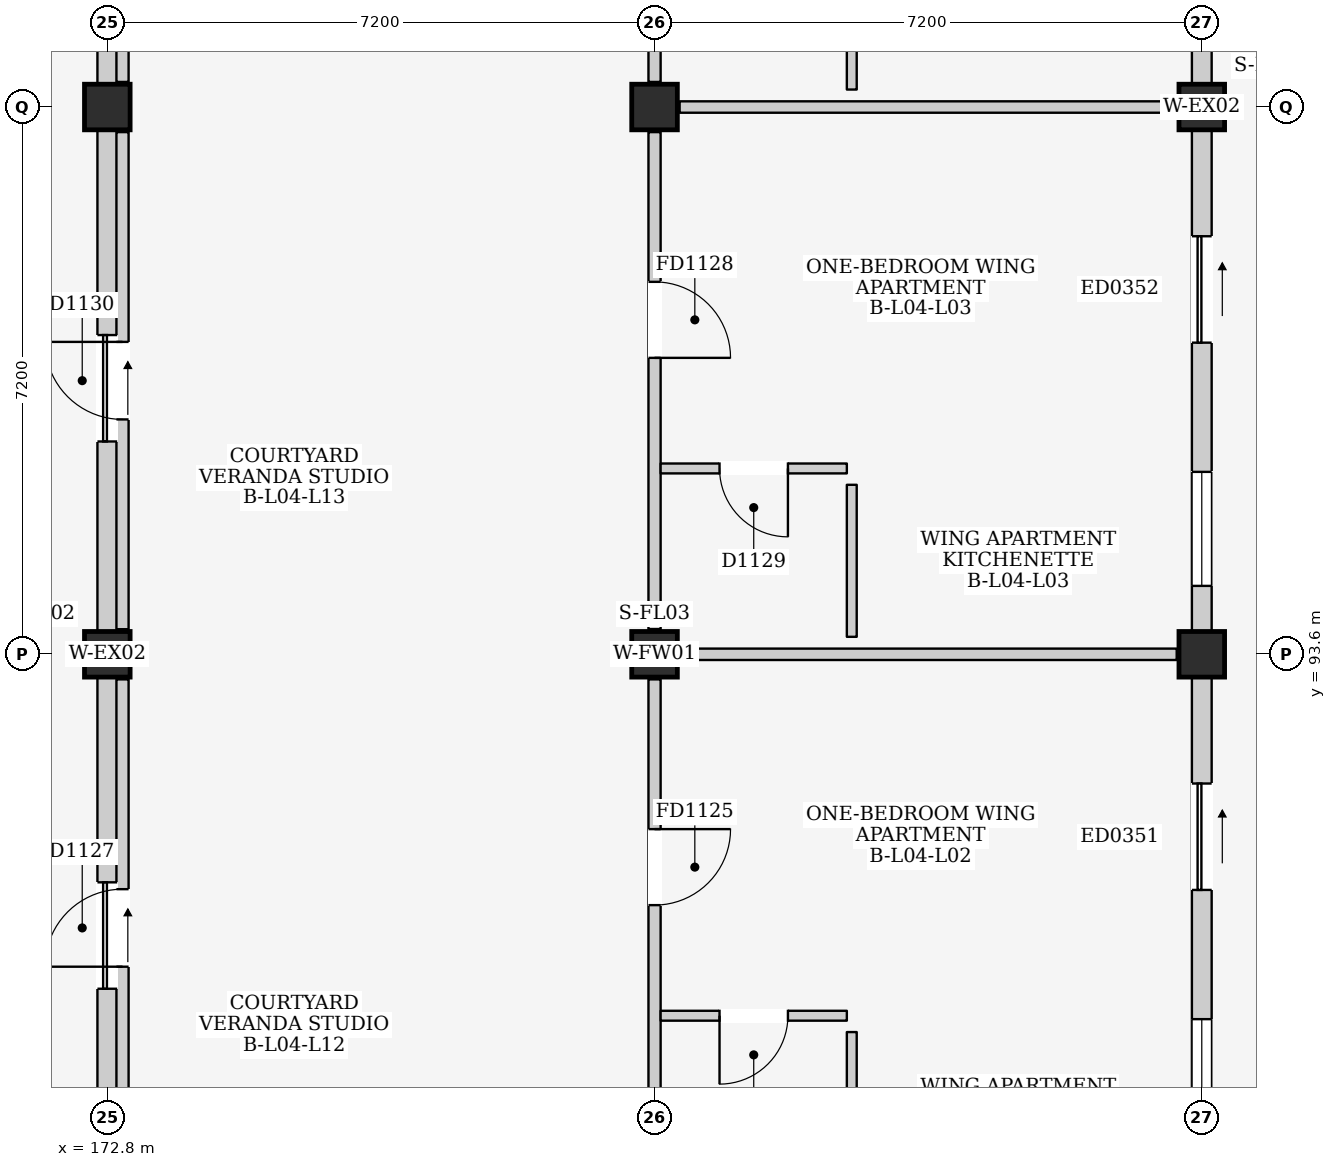
"""IFC4 building model, lengths in metres.
Left out: names, types, materials, properties, quantities, classifications, styles, units other than length and angle.
Written with IfcOpenShell. Run it as: python <this file> out.ifc"""

import sys

from ifc_helpers import new_model, si_unit, direction, frame, frame_2d, origin, origin_2d, place, context, subcontext, project, spatial, rectangle, extrude, element, fill, save


model = new_model("IFC4")
c1 = context("Model", 3, precision=1e-05, world=origin(), true_north=direction((0.0, 1.0)))
c2 = subcontext(c1, "Body", "Model", "MODEL_VIEW")
j1 = project(units=[si_unit("LENGTHUNIT", "METRE"), si_unit("PLANEANGLEUNIT", "RADIAN")], contexts=[c1])
p1 = place(None, origin())
s1 = spatial("IfcSite", under=j1, at=p1, CompositionType="ELEMENT")
p2 = place(p1, origin())
s2 = spatial("IfcBuilding", under=s1, at=p2, CompositionType="ELEMENT")
p3 = place(p2, frame((0.0, 0.0, 15.4)))
s3 = spatial("IfcBuildingStorey", under=s2, at=p3, CompositionType="ELEMENT", Elevation=15.4)
for number, where, z_axis, x_axis in (
    (1, (172.8, 93.6, 0.0), (0.0, 0.0, 1.0), (1.0, 0.0, 0.0)),
    (2, (172.8, 100.8, 0.0), (0.0, 0.0, 1.0), (1.0, 0.0, 0.0)),
    (3, (180.0, 93.6, 0.0), (0.0, 0.0, 1.0), (1.0, 0.0, 0.0)),
    (4, (180.0, 100.8, 0.0), (0.0, 0.0, 1.0), (1.0, 0.0, 0.0)),
    (5, (187.2, 93.6, 0.0), (0.0, 0.0, 1.0), (1.0, 0.0, 0.0)),
    (6, (187.2, 100.8, 0.0), (0.0, 0.0, 1.0), (1.0, 0.0, 0.0)),
):
    element("IfcColumn", number, at=place(p3, frame(where, z_axis=z_axis, x_axis=x_axis)), inside=s3, PredefinedType="COLUMN", context=c2, shape_type="SweptSolid", body=[
        extrude(rectangle(XDim=0.6, YDim=0.6, at=origin_2d()), origin(), (0.0, 0.0, 1.0), 3.2),
    ])
p4 = place(p3, frame((172.8, 86.7, 0.0), z_axis=(0.0, 0.0, 1.0), x_axis=(0.0, 1.0, 0.0)))
e7 = element("IfcWall", 7, at=p4, inside=s3, PredefinedType="ELEMENTEDWALL", context=c2, shape_type="SweptSolid", body=[
    extrude(rectangle(XDim=6.6, YDim=0.26, at=frame_2d((3.3, 0.0))), origin(), (0.0, 0.0, 1.0), 2.385),
])
p5 = place(p4, frame((2.5, 0.0, 0.0)))
e8 = element("IfcOpeningElement", 8, at=p5, cuts=e7, PredefinedType="OPENING", context=c2, shape_type="SweptSolid", body=[
    extrude(rectangle(XDim=1.4, YDim=2.1, at=frame_2d((0.7, 1.05))), frame((0.0, 0.145, 0.0), z_axis=(0.0, -1.0, 0.0), x_axis=(1.0, 0.0, 0.0)), (0.0, 0.0, 1.0), 0.29),
])
p6 = place(p3, frame((172.8, 93.9, 0.0), z_axis=(0.0, 0.0, 1.0), x_axis=(0.0, 1.0, 0.0)))
e9 = element("IfcWall", 9, at=p6, inside=s3, PredefinedType="ELEMENTEDWALL", context=c2, shape_type="SweptSolid", body=[
    extrude(rectangle(XDim=6.6, YDim=0.26, at=frame_2d((3.3, 0.0))), origin(), (0.0, 0.0, 1.0), 2.385),
])
p7 = place(p6, frame((2.5, 0.0, 0.0)))
e10 = element("IfcOpeningElement", 10, at=p7, cuts=e9, PredefinedType="OPENING", context=c2, shape_type="SweptSolid", body=[
    extrude(rectangle(XDim=1.4, YDim=2.1, at=frame_2d((0.7, 1.05))), frame((0.0, 0.145, 0.0), z_axis=(0.0, -1.0, 0.0), x_axis=(1.0, 0.0, 0.0)), (0.0, 0.0, 1.0), 0.29),
])
p8 = place(p3, frame((172.8, 101.1, 0.0), z_axis=(0.0, 0.0, 1.0), x_axis=(0.0, 1.0, 0.0)))
e11 = element("IfcWall", 11, at=p8, inside=s3, PredefinedType="ELEMENTEDWALL", context=c2, shape_type="SweptSolid", body=[
    extrude(rectangle(XDim=6.6, YDim=0.26, at=frame_2d((3.3, 0.0))), origin(), (0.0, 0.0, 1.0), 2.385),
])
p9 = place(p8, frame((2.5, 0.0, 0.0)))
e12 = element("IfcOpeningElement", 12, at=p9, cuts=e11, PredefinedType="OPENING", context=c2, shape_type="SweptSolid", body=[
    extrude(rectangle(XDim=1.4, YDim=2.1, at=frame_2d((0.7, 1.05))), frame((0.0, 0.145, 0.0), z_axis=(0.0, -1.0, 0.0), x_axis=(1.0, 0.0, 0.0)), (0.0, 0.0, 1.0), 0.29),
])
p10 = place(p3, frame((187.2, 86.7, 0.0), z_axis=(0.0, 0.0, 1.0), x_axis=(0.0, 1.0, 0.0)))
e13 = element("IfcWall", 13, at=p10, inside=s3, PredefinedType="ELEMENTEDWALL", context=c2, shape_type="SweptSolid", body=[
    extrude(rectangle(XDim=6.6, YDim=0.26, at=frame_2d((3.3, 0.0))), origin(), (0.0, 0.0, 1.0), 2.43),
])
p11 = place(p10, frame((3.8, 0.0, 0.0)))
e14 = element("IfcOpeningElement", 14, at=p11, cuts=e13, PredefinedType="OPENING", context=c2, shape_type="SweptSolid", body=[
    extrude(rectangle(XDim=1.4, YDim=2.1, at=frame_2d((0.7, 1.05))), frame((0.0, 0.145, 0.0), z_axis=(0.0, -1.0, 0.0), x_axis=(1.0, 0.0, 0.0)), (0.0, 0.0, 1.0), 0.29),
])
p12 = place(p10, frame((0.6, 0.0, 0.81)))
e15 = element("IfcOpeningElement", 15, at=p12, cuts=e13, PredefinedType="OPENING", context=c2, shape_type="SweptSolid", body=[
    extrude(rectangle(XDim=1.5, YDim=1.5, at=frame_2d((0.75, 0.75))), frame((0.0, 0.145, 0.0), z_axis=(0.0, -1.0, 0.0), x_axis=(1.0, 0.0, 0.0)), (0.0, 0.0, 1.0), 0.29),
])
p13 = place(p3, frame((187.2, 93.9, 0.0), z_axis=(0.0, 0.0, 1.0), x_axis=(0.0, 1.0, 0.0)))
e16 = element("IfcWall", 16, at=p13, inside=s3, PredefinedType="ELEMENTEDWALL", context=c2, shape_type="SweptSolid", body=[
    extrude(rectangle(XDim=6.6, YDim=0.26, at=frame_2d((3.3, 0.0))), origin(), (0.0, 0.0, 1.0), 2.43),
])
p14 = place(p13, frame((3.8, 0.0, 0.0)))
e17 = element("IfcOpeningElement", 17, at=p14, cuts=e16, PredefinedType="OPENING", context=c2, shape_type="SweptSolid", body=[
    extrude(rectangle(XDim=1.4, YDim=2.1, at=frame_2d((0.7, 1.05))), frame((0.0, 0.145, 0.0), z_axis=(0.0, -1.0, 0.0), x_axis=(1.0, 0.0, 0.0)), (0.0, 0.0, 1.0), 0.29),
])
p15 = place(p13, frame((0.6, 0.0, 0.81)))
e18 = element("IfcOpeningElement", 18, at=p15, cuts=e16, PredefinedType="OPENING", context=c2, shape_type="SweptSolid", body=[
    extrude(rectangle(XDim=1.5, YDim=1.5, at=frame_2d((0.75, 0.75))), frame((0.0, 0.145, 0.0), z_axis=(0.0, -1.0, 0.0), x_axis=(1.0, 0.0, 0.0)), (0.0, 0.0, 1.0), 0.29),
])
p16 = place(p3, frame((187.2, 101.1, 0.0), z_axis=(0.0, 0.0, 1.0), x_axis=(0.0, 1.0, 0.0)))
e19 = element("IfcWall", 19, at=p16, inside=s3, PredefinedType="ELEMENTEDWALL", context=c2, shape_type="SweptSolid", body=[
    extrude(rectangle(XDim=6.6, YDim=0.26, at=frame_2d((3.3, 0.0))), origin(), (0.0, 0.0, 1.0), 2.43),
])
p17 = place(p16, frame((3.8, 0.0, 0.0)))
e20 = element("IfcOpeningElement", 20, at=p17, cuts=e19, PredefinedType="OPENING", context=c2, shape_type="SweptSolid", body=[
    extrude(rectangle(XDim=1.4, YDim=2.1, at=frame_2d((0.7, 1.05))), frame((0.0, 0.145, 0.0), z_axis=(0.0, -1.0, 0.0), x_axis=(1.0, 0.0, 0.0)), (0.0, 0.0, 1.0), 0.29),
])
p18 = place(p16, frame((0.6, 0.0, 0.81)))
e21 = element("IfcOpeningElement", 21, at=p18, cuts=e19, PredefinedType="OPENING", context=c2, shape_type="SweptSolid", body=[
    extrude(rectangle(XDim=1.5, YDim=1.5, at=frame_2d((0.75, 0.75))), frame((0.0, 0.145, 0.0), z_axis=(0.0, -1.0, 0.0), x_axis=(1.0, 0.0, 0.0)), (0.0, 0.0, 1.0), 0.29),
])
p19 = place(p3, frame((180.0, 86.73, 0.0), z_axis=(0.0, 0.0, 1.0), x_axis=(0.0, 1.0, 0.0)))
e22 = element("IfcWall", 22, at=p19, inside=s3, PredefinedType="PARTITIONING", context=c2, shape_type="SweptSolid", body=[
    extrude(rectangle(XDim=6.54, YDim=0.16, at=frame_2d((3.27, 0.0))), origin(), (0.0, 0.0, 1.0), 2.385),
])
p20 = place(p19, frame((3.57, 0.0, 0.0)))
e23 = element("IfcOpeningElement", 23, at=p20, cuts=e22, PredefinedType="OPENING", context=c2, shape_type="SweptSolid", body=[
    extrude(rectangle(XDim=1.0, YDim=2.15, at=frame_2d((0.5, 1.075))), frame((0.0, 0.095, 0.0), z_axis=(0.0, -1.0, 0.0), x_axis=(1.0, 0.0, 0.0)), (0.0, 0.0, 1.0), 0.19),
])
p21 = place(p3, frame((180.33, 93.6, 0.0), z_axis=(0.0, 0.0, 1.0), x_axis=(1.0, 0.0, 0.0)))
e24 = element("IfcWall", 24, at=p21, inside=s3, PredefinedType="PARTITIONING", context=c2, shape_type="SweptSolid", body=[
    extrude(rectangle(XDim=6.54, YDim=0.15, at=frame_2d((3.27, 0.0))), origin(), (0.0, 0.0, 1.0), 2.335),
])
p22 = place(p3, frame((180.08, 88.845, 0.0), z_axis=(0.0, 0.0, 1.0), x_axis=(1.0, 0.0, 0.0)))
e25 = element("IfcWall", 25, at=p22, inside=s3, PredefinedType="PARTITIONING", context=c2, shape_type="SweptSolid", body=[
    extrude(rectangle(XDim=2.45, YDim=0.13, at=frame_2d((1.225, 0.0))), origin(), (0.0, 0.0, 1.0), 2.95),
])
p23 = place(p22, frame((0.775, 0.0, 0.0)))
e26 = element("IfcOpeningElement", 26, at=p23, cuts=e25, PredefinedType="OPENING", context=c2, shape_type="SweptSolid", body=[
    extrude(rectangle(XDim=0.9, YDim=2.1, at=frame_2d((0.45, 1.05))), frame((0.0, 0.08, 0.0), z_axis=(0.0, -1.0, 0.0), x_axis=(1.0, 0.0, 0.0)), (0.0, 0.0, 1.0), 0.16),
])
p24 = place(p3, frame((182.595, 86.63, 0.0), z_axis=(0.0, 0.0, 1.0), x_axis=(0.0, 1.0, 0.0)))
e27 = element("IfcWall", 27, at=p24, inside=s3, PredefinedType="PARTITIONING", context=c2, shape_type="SweptSolid", body=[
    extrude(rectangle(XDim=2.0, YDim=0.13, at=frame_2d((1.0, 0.0))), origin(), (0.0, 0.0, 1.0), 2.95),
])
p25 = place(p3, frame((173.0, 86.73, 0.0), z_axis=(0.0, 0.0, 1.0), x_axis=(0.0, 1.0, 0.0)))
e28 = element("IfcWall", 28, at=p25, inside=s3, PredefinedType="PARTITIONING", context=c2, shape_type="SweptSolid", body=[
    extrude(rectangle(XDim=6.54, YDim=0.16, at=frame_2d((3.27, 0.0))), origin(), (0.0, 0.0, 1.0), 2.385),
])
p26 = place(p25, frame((2.76, 0.0, 0.0)))
e29 = element("IfcOpeningElement", 29, at=p26, cuts=e28, PredefinedType="OPENING", context=c2, shape_type="SweptSolid", body=[
    extrude(rectangle(XDim=1.02, YDim=2.18, at=frame_2d((0.51, 1.09))), frame((0.0, 0.095, 0.0), z_axis=(0.0, -1.0, 0.0), x_axis=(1.0, 0.0, 0.0)), (0.0, 0.0, 1.0), 0.19),
])
p27 = place(p3, frame((180.0, 93.93, 0.0), z_axis=(0.0, 0.0, 1.0), x_axis=(0.0, 1.0, 0.0)))
e30 = element("IfcWall", 30, at=p27, inside=s3, PredefinedType="PARTITIONING", context=c2, shape_type="SweptSolid", body=[
    extrude(rectangle(XDim=6.54, YDim=0.16, at=frame_2d((3.27, 0.0))), origin(), (0.0, 0.0, 1.0), 2.385),
])
p28 = place(p27, frame((3.57, 0.0, 0.0)))
e31 = element("IfcOpeningElement", 31, at=p28, cuts=e30, PredefinedType="OPENING", context=c2, shape_type="SweptSolid", body=[
    extrude(rectangle(XDim=1.0, YDim=2.15, at=frame_2d((0.5, 1.075))), frame((0.0, 0.095, 0.0), z_axis=(0.0, -1.0, 0.0), x_axis=(1.0, 0.0, 0.0)), (0.0, 0.0, 1.0), 0.19),
])
p29 = place(p3, frame((180.33, 100.8, 0.0), z_axis=(0.0, 0.0, 1.0), x_axis=(1.0, 0.0, 0.0)))
e32 = element("IfcWall", 32, at=p29, inside=s3, PredefinedType="PARTITIONING", context=c2, shape_type="SweptSolid", body=[
    extrude(rectangle(XDim=6.54, YDim=0.15, at=frame_2d((3.27, 0.0))), origin(), (0.0, 0.0, 1.0), 2.335),
])
p30 = place(p3, frame((180.08, 96.045, 0.0), z_axis=(0.0, 0.0, 1.0), x_axis=(1.0, 0.0, 0.0)))
e33 = element("IfcWall", 33, at=p30, inside=s3, PredefinedType="PARTITIONING", context=c2, shape_type="SweptSolid", body=[
    extrude(rectangle(XDim=2.45, YDim=0.13, at=frame_2d((1.225, 0.0))), origin(), (0.0, 0.0, 1.0), 2.95),
])
p31 = place(p30, frame((0.775, 0.0, 0.0)))
e34 = element("IfcOpeningElement", 34, at=p31, cuts=e33, PredefinedType="OPENING", context=c2, shape_type="SweptSolid", body=[
    extrude(rectangle(XDim=0.9, YDim=2.1, at=frame_2d((0.45, 1.05))), frame((0.0, 0.08, 0.0), z_axis=(0.0, -1.0, 0.0), x_axis=(1.0, 0.0, 0.0)), (0.0, 0.0, 1.0), 0.16),
])
p32 = place(p3, frame((182.595, 93.83, 0.0), z_axis=(0.0, 0.0, 1.0), x_axis=(0.0, 1.0, 0.0)))
e35 = element("IfcWall", 35, at=p32, inside=s3, PredefinedType="PARTITIONING", context=c2, shape_type="SweptSolid", body=[
    extrude(rectangle(XDim=2.0, YDim=0.13, at=frame_2d((1.0, 0.0))), origin(), (0.0, 0.0, 1.0), 2.95),
])
p33 = place(p3, frame((173.0, 93.93, 0.0), z_axis=(0.0, 0.0, 1.0), x_axis=(0.0, 1.0, 0.0)))
e36 = element("IfcWall", 36, at=p33, inside=s3, PredefinedType="PARTITIONING", context=c2, shape_type="SweptSolid", body=[
    extrude(rectangle(XDim=6.54, YDim=0.16, at=frame_2d((3.27, 0.0))), origin(), (0.0, 0.0, 1.0), 2.385),
])
p34 = place(p33, frame((2.76, 0.0, 0.0)))
e37 = element("IfcOpeningElement", 37, at=p34, cuts=e36, PredefinedType="OPENING", context=c2, shape_type="SweptSolid", body=[
    extrude(rectangle(XDim=1.02, YDim=2.18, at=frame_2d((0.51, 1.09))), frame((0.0, 0.095, 0.0), z_axis=(0.0, -1.0, 0.0), x_axis=(1.0, 0.0, 0.0)), (0.0, 0.0, 1.0), 0.19),
])
p35 = place(p3, frame((180.0, 101.13, 0.0), z_axis=(0.0, 0.0, 1.0), x_axis=(0.0, 1.0, 0.0)))
e38 = element("IfcWall", 38, at=p35, inside=s3, PredefinedType="PARTITIONING", context=c2, shape_type="SweptSolid", body=[
    extrude(rectangle(XDim=6.54, YDim=0.16, at=frame_2d((3.27, 0.0))), origin(), (0.0, 0.0, 1.0), 2.385),
])
p36 = place(p35, frame((3.57, 0.0, 0.0)))
e39 = element("IfcOpeningElement", 39, at=p36, cuts=e38, PredefinedType="OPENING", context=c2, shape_type="SweptSolid", body=[
    extrude(rectangle(XDim=1.0, YDim=2.15, at=frame_2d((0.5, 1.075))), frame((0.0, 0.095, 0.0), z_axis=(0.0, -1.0, 0.0), x_axis=(1.0, 0.0, 0.0)), (0.0, 0.0, 1.0), 0.19),
])
p37 = place(p3, frame((182.595, 101.03, 0.0), z_axis=(0.0, 0.0, 1.0), x_axis=(0.0, 1.0, 0.0)))
e40 = element("IfcWall", 40, at=p37, inside=s3, PredefinedType="PARTITIONING", context=c2, shape_type="SweptSolid", body=[
    extrude(rectangle(XDim=2.0, YDim=0.13, at=frame_2d((1.0, 0.0))), origin(), (0.0, 0.0, 1.0), 2.95),
])
p38 = place(p3, frame((173.0, 101.13, 0.0), z_axis=(0.0, 0.0, 1.0), x_axis=(0.0, 1.0, 0.0)))
e41 = element("IfcWall", 41, at=p38, inside=s3, PredefinedType="PARTITIONING", context=c2, shape_type="SweptSolid", body=[
    extrude(rectangle(XDim=6.54, YDim=0.16, at=frame_2d((3.27, 0.0))), origin(), (0.0, 0.0, 1.0), 2.385),
])
p39 = place(p38, frame((2.76, 0.0, 0.0)))
e42 = element("IfcOpeningElement", 42, at=p39, cuts=e41, PredefinedType="OPENING", context=c2, shape_type="SweptSolid", body=[
    extrude(rectangle(XDim=1.02, YDim=2.18, at=frame_2d((0.51, 1.09))), frame((0.0, 0.095, 0.0), z_axis=(0.0, -1.0, 0.0), x_axis=(1.0, 0.0, 0.0)), (0.0, 0.0, 1.0), 0.19),
])
p40 = place(p5, frame((1.4, 0.0, 0.0), z_axis=(0.0, 0.0, 1.0), x_axis=(-1.0, 0.0, 0.0)))
e43 = element("IfcDoor", 43, at=p40, inside=s3, OperationType="SLIDING_TO_RIGHT", PredefinedType="DOOR", context=c2, shape_type="SweptSolid", body=[
    extrude(rectangle(XDim=1.4, YDim=2.1, at=frame_2d((0.7, 1.05))), frame((0.0, 0.025, 0.0), z_axis=(0.0, -1.0, 0.0), x_axis=(1.0, 0.0, 0.0)), (0.0, 0.0, 1.0), 0.05),
])
fill(e8, e43)
p41 = place(p7, frame((1.4, 0.0, 0.0), z_axis=(0.0, 0.0, 1.0), x_axis=(-1.0, 0.0, 0.0)))
e44 = element("IfcDoor", 44, at=p41, inside=s3, OperationType="SLIDING_TO_RIGHT", PredefinedType="DOOR", context=c2, shape_type="SweptSolid", body=[
    extrude(rectangle(XDim=1.4, YDim=2.1, at=frame_2d((0.7, 1.05))), frame((0.0, 0.025, 0.0), z_axis=(0.0, -1.0, 0.0), x_axis=(1.0, 0.0, 0.0)), (0.0, 0.0, 1.0), 0.05),
])
fill(e10, e44)
p42 = place(p11, frame((1.4, 0.0, 0.0), z_axis=(0.0, 0.0, 1.0), x_axis=(-1.0, 0.0, 0.0)))
e45 = element("IfcDoor", 45, at=p42, inside=s3, OperationType="SLIDING_TO_RIGHT", PredefinedType="DOOR", context=c2, shape_type="SweptSolid", body=[
    extrude(rectangle(XDim=1.4, YDim=2.1, at=frame_2d((0.7, 1.05))), frame((0.0, 0.025, 0.0), z_axis=(0.0, -1.0, 0.0), x_axis=(1.0, 0.0, 0.0)), (0.0, 0.0, 1.0), 0.05),
])
fill(e14, e45)
p43 = place(p12, origin())
e46 = element("IfcWindow", 46, at=p43, inside=s3, PartitioningType="DOUBLE_PANEL_VERTICAL", PredefinedType="WINDOW", context=c2, shape_type="SweptSolid", body=[
    extrude(rectangle(XDim=1.5, YDim=1.5, at=frame_2d((0.75, 0.75))), frame((0.0, 0.03, 0.0), z_axis=(0.0, -1.0, 0.0), x_axis=(1.0, 0.0, 0.0)), (0.0, 0.0, 1.0), 0.06),
])
fill(e15, e46)
p44 = place(p14, frame((1.4, 0.0, 0.0), z_axis=(0.0, 0.0, 1.0), x_axis=(-1.0, 0.0, 0.0)))
e47 = element("IfcDoor", 47, at=p44, inside=s3, OperationType="SLIDING_TO_RIGHT", PredefinedType="DOOR", context=c2, shape_type="SweptSolid", body=[
    extrude(rectangle(XDim=1.4, YDim=2.1, at=frame_2d((0.7, 1.05))), frame((0.0, 0.025, 0.0), z_axis=(0.0, -1.0, 0.0), x_axis=(1.0, 0.0, 0.0)), (0.0, 0.0, 1.0), 0.05),
])
fill(e17, e47)
p45 = place(p15, origin())
e48 = element("IfcWindow", 48, at=p45, inside=s3, PartitioningType="DOUBLE_PANEL_VERTICAL", PredefinedType="WINDOW", context=c2, shape_type="SweptSolid", body=[
    extrude(rectangle(XDim=1.5, YDim=1.5, at=frame_2d((0.75, 0.75))), frame((0.0, 0.03, 0.0), z_axis=(0.0, -1.0, 0.0), x_axis=(1.0, 0.0, 0.0)), (0.0, 0.0, 1.0), 0.06),
])
fill(e18, e48)
p46 = place(p20, frame((1.0, 0.0, 0.0), z_axis=(0.0, 0.0, 1.0), x_axis=(-1.0, 0.0, 0.0)))
e49 = element("IfcDoor", 49, at=p46, inside=s3, OperationType="SINGLE_SWING_LEFT", PredefinedType="DOOR", context=c2, shape_type="SweptSolid", body=[
    extrude(rectangle(XDim=1.0, YDim=2.15, at=frame_2d((0.5, 1.075))), frame((0.0, 0.025, 0.0), z_axis=(0.0, -1.0, 0.0), x_axis=(1.0, 0.0, 0.0)), (0.0, 0.0, 1.0), 0.05),
])
fill(e23, e49)
p47 = place(p23, frame((0.9, 0.0, 0.0), z_axis=(0.0, 0.0, 1.0), x_axis=(-1.0, 0.0, 0.0)))
e50 = element("IfcDoor", 50, at=p47, inside=s3, OperationType="SINGLE_SWING_RIGHT", PredefinedType="DOOR", context=c2, shape_type="SweptSolid", body=[
    extrude(rectangle(XDim=0.9, YDim=2.1, at=frame_2d((0.45, 1.05))), frame((0.0, 0.025, 0.0), z_axis=(0.0, -1.0, 0.0), x_axis=(1.0, 0.0, 0.0)), (0.0, 0.0, 1.0), 0.05),
])
fill(e26, e50)
p48 = place(p26, origin())
e51 = element("IfcDoor", 51, at=p48, inside=s3, OperationType="SINGLE_SWING_LEFT", PredefinedType="DOOR", context=c2, shape_type="SweptSolid", body=[
    extrude(rectangle(XDim=1.02, YDim=2.18, at=frame_2d((0.51, 1.09))), frame((0.0, 0.025, 0.0), z_axis=(0.0, -1.0, 0.0), x_axis=(1.0, 0.0, 0.0)), (0.0, 0.0, 1.0), 0.05),
])
fill(e29, e51)
p49 = place(p28, frame((1.0, 0.0, 0.0), z_axis=(0.0, 0.0, 1.0), x_axis=(-1.0, 0.0, 0.0)))
e52 = element("IfcDoor", 52, at=p49, inside=s3, OperationType="SINGLE_SWING_RIGHT", PredefinedType="DOOR", context=c2, shape_type="SweptSolid", body=[
    extrude(rectangle(XDim=1.0, YDim=2.15, at=frame_2d((0.5, 1.075))), frame((0.0, 0.025, 0.0), z_axis=(0.0, -1.0, 0.0), x_axis=(1.0, 0.0, 0.0)), (0.0, 0.0, 1.0), 0.05),
])
fill(e31, e52)
p50 = place(p31, frame((0.9, 0.0, 0.0), z_axis=(0.0, 0.0, 1.0), x_axis=(-1.0, 0.0, 0.0)))
e53 = element("IfcDoor", 53, at=p50, inside=s3, OperationType="SINGLE_SWING_LEFT", PredefinedType="DOOR", context=c2, shape_type="SweptSolid", body=[
    extrude(rectangle(XDim=0.9, YDim=2.1, at=frame_2d((0.45, 1.05))), frame((0.0, 0.025, 0.0), z_axis=(0.0, -1.0, 0.0), x_axis=(1.0, 0.0, 0.0)), (0.0, 0.0, 1.0), 0.05),
])
fill(e34, e53)
p51 = place(p34, origin())
e54 = element("IfcDoor", 54, at=p51, inside=s3, OperationType="SINGLE_SWING_RIGHT", PredefinedType="DOOR", context=c2, shape_type="SweptSolid", body=[
    extrude(rectangle(XDim=1.02, YDim=2.18, at=frame_2d((0.51, 1.09))), frame((0.0, 0.025, 0.0), z_axis=(0.0, -1.0, 0.0), x_axis=(1.0, 0.0, 0.0)), (0.0, 0.0, 1.0), 0.05),
])
fill(e37, e54)
save(model, sys.argv[1])
